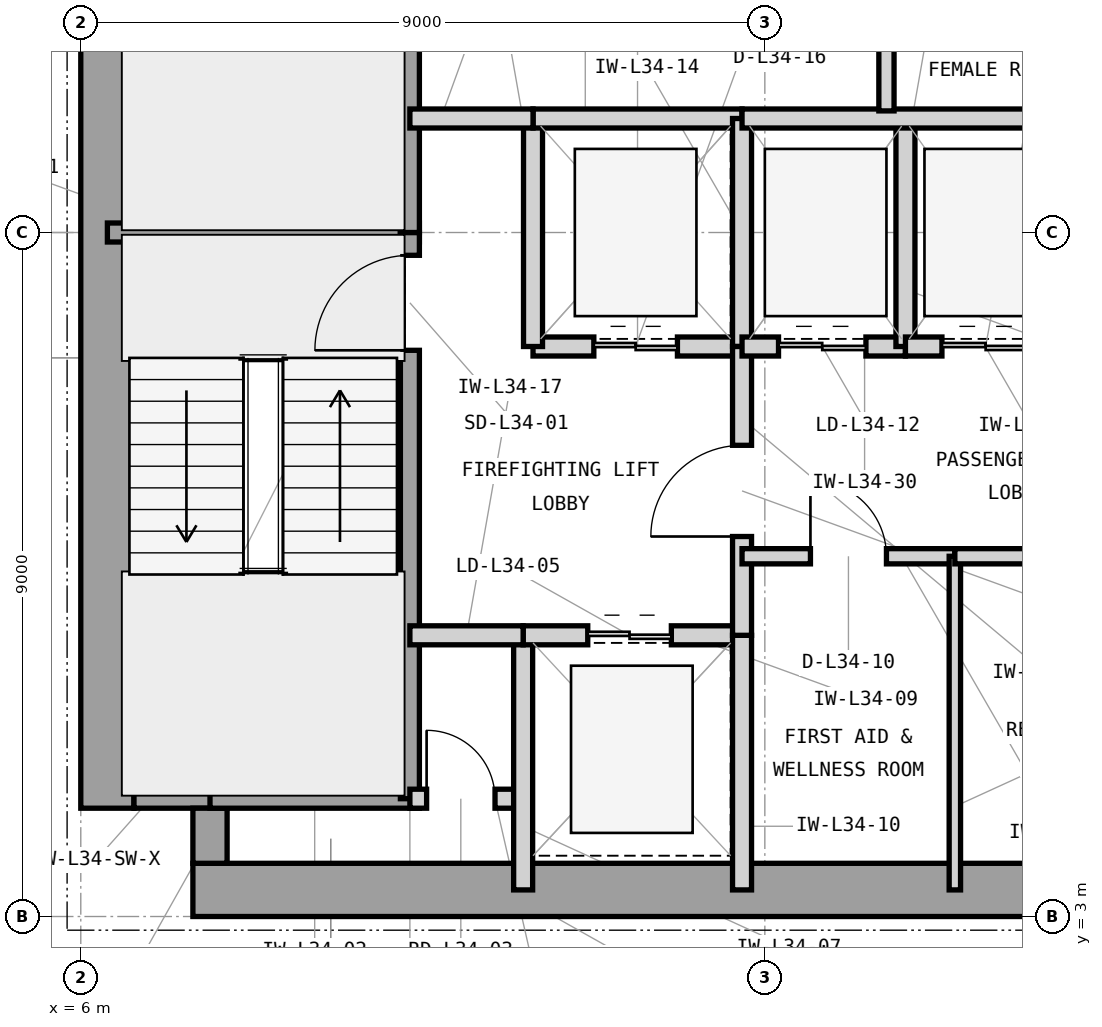
"""IFC4 building model, lengths in metres.
Left out: names, types, materials, properties, quantities, classifications, styles, units other than length and angle.
Written with IfcOpenShell. Run it as: python <this file> out.ifc"""

import sys

from ifc_helpers import new_model, si_unit, direction, frame, frame_2d, origin, place, context, subcontext, project, spatial, rectangle, extrude, element, fill, save


model = new_model("IFC4")
c1 = context("Model", 3, precision=1e-05, world=origin(), true_north=direction((0.0, 1.0)))
c2 = subcontext(c1, "Body", "Model", "MODEL_VIEW")
j1 = project(units=[si_unit("LENGTHUNIT", "METRE"), si_unit("PLANEANGLEUNIT", "RADIAN")], contexts=[c1])
p1 = place(None, origin())
s1 = spatial("IfcSite", under=j1, at=p1, CompositionType="ELEMENT")
p2 = place(p1, origin())
s2 = spatial("IfcBuilding", under=s1, at=p2, CompositionType="ELEMENT")
p3 = place(p2, frame((0.0, 0.0, 144.0)))
s3 = spatial("IfcBuildingStorey", under=s2, at=p3, CompositionType="ELEMENT", Elevation=144.0)
p4 = place(p3, frame((7.475, 3.35, 0.0), z_axis=(0.0, 0.0, 1.0), x_axis=(1.0, 0.0, 0.0)))
e1 = element("IfcWall", 1, at=p4, inside=s3, PredefinedType="SHEAR", context=c2, shape_type="SweptSolid", body=[
    extrude(rectangle(XDim=16.525, YDim=0.7, at=frame_2d((8.262, 0.0))), origin(), (0.0, 0.0, 1.0), 3.9),
])
p5 = place(p3, frame((6.35, 4.425, 0.0), z_axis=(0.0, 0.0, 1.0), x_axis=(0.0, 1.0, 0.0)))
e2 = element("IfcWall", 2, at=p5, inside=s3, PredefinedType="SHEAR", context=c2, shape_type="SweptSolid", body=[
    extrude(rectangle(XDim=15.15, YDim=0.7, at=frame_2d((7.575, 0.0))), origin(), (0.0, 0.0, 1.0), 3.9),
])
p6 = place(p3, frame((6.7, 4.65, 0.0), z_axis=(0.0, 0.0, 1.0), x_axis=(1.0, 0.0, 0.0)))
e3 = element("IfcWall", 3, at=p6, inside=s3, PredefinedType="SHEAR", context=c2, shape_type="SweptSolid", body=[
    extrude(rectangle(XDim=1.225, YDim=0.45, at=frame_2d((0.613, 0.0))), origin(), (0.0, 0.0, 1.0), 3.9),
])
p7 = place(p3, frame((7.7, 3.7, 0.0), z_axis=(0.0, 0.0, 1.0), x_axis=(0.0, 1.0, 0.0)))
e4 = element("IfcWall", 4, at=p7, inside=s3, PredefinedType="SHEAR", context=c2, shape_type="SweptSolid", body=[
    extrude(rectangle(XDim=0.725, YDim=0.45, at=frame_2d((0.363, 0.0))), origin(), (0.0, 0.0, 1.0), 3.9),
])
p8 = place(p3, frame((6.35, 12.0, 0.0), z_axis=(0.0, 0.0, 1.0), x_axis=(1.0, 0.0, 0.0)))
e5 = element("IfcWall", 5, at=p8, inside=s3, PredefinedType="SHEAR", context=c2, shape_type="SweptSolid", body=[
    extrude(rectangle(XDim=4.105, YDim=0.25, at=frame_2d((2.052, 0.0))), origin(), (0.0, 0.0, 1.0), 3.9),
])
p9 = place(p3, frame((7.7, 4.55, 0.0), z_axis=(0.0, 0.0, 1.0), x_axis=(1.0, 0.0, 0.0)))
e6 = element("IfcWall", 6, at=p9, inside=s3, PredefinedType="SHEAR", context=c2, shape_type="SweptSolid", body=[
    extrude(rectangle(XDim=2.755, YDim=0.25, at=frame_2d((1.377, 0.0))), origin(), (0.0, 0.0, 1.0), 3.9),
])
p10 = place(p3, frame((10.33, 4.55, 0.0), z_axis=(0.0, 0.0, 1.0), x_axis=(0.0, 1.0, 0.0)))
e7 = element("IfcWall", 7, at=p10, inside=s3, PredefinedType="SHEAR", context=c2, shape_type="SweptSolid", body=[
    extrude(rectangle(XDim=7.45, YDim=0.25, at=frame_2d((3.725, 0.0))), origin(), (0.0, 0.0, 1.0), 3.9),
])
p11 = place(p10, frame((5.9, 0.0, 0.0)))
e8 = element("IfcOpeningElement", 8, at=p11, cuts=e7, PredefinedType="OPENING", context=c2, shape_type="SweptSolid", body=[
    extrude(rectangle(XDim=1.25, YDim=2.2, at=frame_2d((0.625, 1.1))), frame((0.0, 0.135, 0.0), z_axis=(0.0, -1.0, 0.0), x_axis=(1.0, 0.0, 0.0)), (0.0, 0.0, 1.0), 0.27),
])
p12 = place(p3, frame((10.33, 12.0, 0.0), z_axis=(0.0, 0.0, 1.0), x_axis=(0.0, 1.0, 0.0)))
e9 = element("IfcWall", 9, at=p12, inside=s3, PredefinedType="SHEAR", context=c2, shape_type="SweptSolid", body=[
    extrude(rectangle(XDim=7.45, YDim=0.25, at=frame_2d((3.725, 0.0))), origin(), (0.0, 0.0, 1.0), 3.9),
])
p13 = place(p12, frame((5.85, 0.0, 0.0)))
e10 = element("IfcOpeningElement", 10, at=p13, cuts=e9, PredefinedType="OPENING", context=c2, shape_type="SweptSolid", body=[
    extrude(rectangle(XDim=1.25, YDim=2.2, at=frame_2d((0.625, 1.1))), frame((0.0, 0.135, 0.0), z_axis=(0.0, -1.0, 0.0), x_axis=(1.0, 0.0, 0.0)), (0.0, 0.0, 1.0), 0.27),
])
p14 = place(p3, frame((10.33, 4.55, 0.0), z_axis=(0.0, 0.0, 1.0), x_axis=(1.0, 0.0, 0.0)))
e11 = element("IfcWall", 11, at=p14, inside=s3, PredefinedType="PARTITIONING", context=c2, shape_type="SweptSolid", body=[
    extrude(rectangle(XDim=1.49, YDim=0.25, at=frame_2d((0.745, 0.0))), origin(), (0.0, 0.0, 1.0), 3.69),
])
p15 = place(p14, frame((0.22, 0.0, 0.0)))
e12 = element("IfcOpeningElement", 12, at=p15, cuts=e11, PredefinedType="OPENING", context=c2, shape_type="SweptSolid", body=[
    extrude(rectangle(XDim=0.9, YDim=2.1, at=frame_2d((0.45, 1.05))), frame((0.0, 0.135, 0.0), z_axis=(0.0, -1.0, 0.0), x_axis=(1.0, 0.0, 0.0)), (0.0, 0.0, 1.0), 0.27),
])
p16 = place(p3, frame((11.82, 3.35, 0.0), z_axis=(0.0, 0.0, 1.0), x_axis=(0.0, 1.0, 0.0)))
e13 = element("IfcWall", 13, at=p16, inside=s3, PredefinedType="PARTITIONING", context=c2, shape_type="SweptSolid", body=[
    extrude(rectangle(XDim=3.35, YDim=0.25, at=frame_2d((1.675, 0.0))), origin(), (0.0, 0.0, 1.0), 3.69),
])
p17 = place(p3, frame((11.82, 6.7, 0.0), z_axis=(0.0, 0.0, 1.0), x_axis=(1.0, 0.0, 0.0)))
e14 = element("IfcWall", 14, at=p17, inside=s3, PredefinedType="PARTITIONING", context=c2, shape_type="SweptSolid", body=[
    extrude(rectangle(XDim=2.88, YDim=0.25, at=frame_2d((1.44, 0.0))), origin(), (0.0, 0.0, 1.0), 3.233),
])
p18 = place(p17, frame((0.85, 0.0, 0.0)))
e15 = element("IfcOpeningElement", 15, at=p18, cuts=e14, PredefinedType="OPENING", context=c2, shape_type="SweptSolid", body=[
    extrude(rectangle(XDim=1.1, YDim=2.25, at=frame_2d((0.55, 1.125))), frame((0.0, 0.135, 0.0), z_axis=(0.0, -1.0, 0.0), x_axis=(1.0, 0.0, 0.0)), (0.0, 0.0, 1.0), 0.27),
])
p19 = place(p3, frame((14.7, 3.35, 0.0), z_axis=(0.0, 0.0, 1.0), x_axis=(0.0, 1.0, 0.0)))
e16 = element("IfcWall", 16, at=p19, inside=s3, PredefinedType="PARTITIONING", context=c2, shape_type="SweptSolid", body=[
    extrude(rectangle(XDim=3.35, YDim=0.25, at=frame_2d((1.675, 0.0))), origin(), (0.0, 0.0, 1.0), 3.69),
])
p20 = place(p3, frame((11.95, 10.5, 0.0), z_axis=(0.0, 0.0, 1.0), x_axis=(1.0, 0.0, 0.0)))
e17 = element("IfcWall", 17, at=p20, inside=s3, PredefinedType="PARTITIONING", context=c2, shape_type="SweptSolid", body=[
    extrude(rectangle(XDim=2.75, YDim=0.25, at=frame_2d((1.375, 0.0))), origin(), (0.0, 0.0, 1.0), 3.233),
])
p21 = place(p20, frame((0.8, 0.0, 0.0)))
e18 = element("IfcOpeningElement", 18, at=p21, cuts=e17, PredefinedType="OPENING", context=c2, shape_type="SweptSolid", body=[
    extrude(rectangle(XDim=1.1, YDim=2.25, at=frame_2d((0.55, 1.125))), frame((0.0, 0.135, 0.0), z_axis=(0.0, -1.0, 0.0), x_axis=(1.0, 0.0, 0.0)), (0.0, 0.0, 1.0), 0.27),
])
p22 = place(p3, frame((11.95, 10.5, 0.0), z_axis=(0.0, 0.0, 1.0), x_axis=(0.0, 1.0, 0.0)))
e19 = element("IfcWall", 19, at=p22, inside=s3, PredefinedType="PARTITIONING", context=c2, shape_type="SweptSolid", body=[
    extrude(rectangle(XDim=3.0, YDim=0.25, at=frame_2d((1.5, 0.0))), origin(), (0.0, 0.0, 1.0), 3.69),
])
p23 = place(p3, frame((11.95, 13.5, 0.0), z_axis=(0.0, 0.0, 1.0), x_axis=(1.0, 0.0, 0.0)))
e20 = element("IfcWall", 20, at=p23, inside=s3, PredefinedType="PARTITIONING", context=c2, shape_type="SweptSolid", body=[
    extrude(rectangle(XDim=2.75, YDim=0.25, at=frame_2d((1.375, 0.0))), origin(), (0.0, 0.0, 1.0), 3.233),
])
p24 = place(p3, frame((14.7, 10.5, 0.0), z_axis=(0.0, 0.0, 1.0), x_axis=(0.0, 1.0, 0.0)))
e21 = element("IfcWall", 21, at=p24, inside=s3, PredefinedType="PARTITIONING", context=c2, shape_type="SweptSolid", body=[
    extrude(rectangle(XDim=3.0, YDim=0.25, at=frame_2d((1.5, 0.0))), origin(), (0.0, 0.0, 1.0), 3.69),
])
p25 = place(p3, frame((14.7, 6.7, 0.0), z_axis=(0.0, 0.0, 1.0), x_axis=(0.0, 1.0, 0.0)))
e22 = element("IfcWall", 22, at=p25, inside=s3, PredefinedType="PARTITIONING", context=c2, shape_type="SweptSolid", body=[
    extrude(rectangle(XDim=3.8, YDim=0.25, at=frame_2d((1.9, 0.0))), origin(), (0.0, 0.0, 1.0), 3.69),
])
p26 = place(p25, frame((1.3, 0.0, 0.0)))
e23 = element("IfcOpeningElement", 23, at=p26, cuts=e22, PredefinedType="OPENING", context=c2, shape_type="SweptSolid", body=[
    extrude(rectangle(XDim=1.2, YDim=2.2, at=frame_2d((0.6, 1.1))), frame((0.0, 0.135, 0.0), z_axis=(0.0, -1.0, 0.0), x_axis=(1.0, 0.0, 0.0)), (0.0, 0.0, 1.0), 0.27),
])
p27 = place(p3, frame((10.33, 13.5, 0.0), z_axis=(0.0, 0.0, 1.0), x_axis=(1.0, 0.0, 0.0)))
e24 = element("IfcWall", 24, at=p27, inside=s3, PredefinedType="PARTITIONING", context=c2, shape_type="SweptSolid", body=[
    extrude(rectangle(XDim=1.62, YDim=0.25, at=frame_2d((0.81, 0.0))), origin(), (0.0, 0.0, 1.0), 3.233),
])
p28 = place(p3, frame((10.33, 6.7, 0.0), z_axis=(0.0, 0.0, 1.0), x_axis=(1.0, 0.0, 0.0)))
e25 = element("IfcWall", 25, at=p28, inside=s3, PredefinedType="PARTITIONING", context=c2, shape_type="SweptSolid", body=[
    extrude(rectangle(XDim=1.49, YDim=0.25, at=frame_2d((0.745, 0.0))), origin(), (0.0, 0.0, 1.0), 3.233),
])
p29 = place(p3, frame((14.7, 7.74, 0.0), z_axis=(0.0, 0.0, 1.0), x_axis=(1.0, 0.0, 0.0)))
e26 = element("IfcWall", 26, at=p29, inside=s3, PredefinedType="PARTITIONING", context=c2, shape_type="SweptSolid", body=[
    extrude(rectangle(XDim=2.8, YDim=0.2, at=frame_2d((1.4, 0.0))), origin(), (0.0, 0.0, 1.0), 3.69),
])
p30 = place(p29, frame((0.9, 0.0, 0.0)))
e27 = element("IfcOpeningElement", 27, at=p30, cuts=e26, PredefinedType="OPENING", context=c2, shape_type="SweptSolid", body=[
    extrude(rectangle(XDim=1.0, YDim=2.15, at=frame_2d((0.5, 1.075))), frame((0.0, 0.11, 0.0), z_axis=(0.0, -1.0, 0.0), x_axis=(1.0, 0.0, 0.0)), (0.0, 0.0, 1.0), 0.22),
])
p31 = place(p3, frame((17.5, 3.35, 0.0), z_axis=(0.0, 0.0, 1.0), x_axis=(0.0, 1.0, 0.0)))
e28 = element("IfcWall", 28, at=p31, inside=s3, PredefinedType="PARTITIONING", context=c2, shape_type="SweptSolid", body=[
    extrude(rectangle(XDim=4.39, YDim=0.15, at=frame_2d((2.195, 0.0))), origin(), (0.0, 0.0, 1.0), 3.69),
])
p32 = place(p3, frame((17.5, 7.74, 0.0), z_axis=(0.0, 0.0, 1.0), x_axis=(1.0, 0.0, 0.0)))
e29 = element("IfcWall", 29, at=p32, inside=s3, PredefinedType="PARTITIONING", context=c2, shape_type="SweptSolid", body=[
    extrude(rectangle(XDim=6.15, YDim=0.2, at=frame_2d((3.075, 0.0))), origin(), (0.0, 0.0, 1.0), 3.69),
])
p33 = place(p32, frame((2.575, 0.0, 0.0)))
e30 = element("IfcOpeningElement", 30, at=p33, cuts=e29, PredefinedType="OPENING", context=c2, shape_type="SweptSolid", body=[
    extrude(rectangle(XDim=1.0, YDim=2.15, at=frame_2d((0.5, 1.075))), frame((0.0, 0.11, 0.0), z_axis=(0.0, -1.0, 0.0), x_axis=(1.0, 0.0, 0.0)), (0.0, 0.0, 1.0), 0.22),
])
p34 = place(p3, frame((14.7, 10.5, 0.0), z_axis=(0.0, 0.0, 1.0), x_axis=(1.0, 0.0, 0.0)))
e31 = element("IfcWall", 31, at=p34, inside=s3, PredefinedType="PARTITIONING", context=c2, shape_type="SweptSolid", body=[
    extrude(rectangle(XDim=2.15, YDim=0.25, at=frame_2d((1.075, 0.0))), origin(), (0.0, 0.0, 1.0), 3.233),
])
p35 = place(p34, frame((0.48, 0.0, 0.0)))
e32 = element("IfcOpeningElement", 32, at=p35, cuts=e31, PredefinedType="OPENING", context=c2, shape_type="SweptSolid", body=[
    extrude(rectangle(XDim=1.15, YDim=2.25, at=frame_2d((0.575, 1.125))), frame((0.0, 0.135, 0.0), z_axis=(0.0, -1.0, 0.0), x_axis=(1.0, 0.0, 0.0)), (0.0, 0.0, 1.0), 0.27),
])
p36 = place(p3, frame((16.85, 10.5, 0.0), z_axis=(0.0, 0.0, 1.0), x_axis=(0.0, 1.0, 0.0)))
e33 = element("IfcWall", 33, at=p36, inside=s3, PredefinedType="PARTITIONING", context=c2, shape_type="SweptSolid", body=[
    extrude(rectangle(XDim=3.0, YDim=0.25, at=frame_2d((1.5, 0.0))), origin(), (0.0, 0.0, 1.0), 3.69),
])
p37 = place(p3, frame((16.85, 10.5, 0.0), z_axis=(0.0, 0.0, 1.0), x_axis=(1.0, 0.0, 0.0)))
e34 = element("IfcWall", 34, at=p37, inside=s3, PredefinedType="PARTITIONING", context=c2, shape_type="SweptSolid", body=[
    extrude(rectangle(XDim=2.1, YDim=0.25, at=frame_2d((1.05, 0.0))), origin(), (0.0, 0.0, 1.0), 3.233),
])
p38 = place(p37, frame((0.48, 0.0, 0.0)))
e35 = element("IfcOpeningElement", 35, at=p38, cuts=e34, PredefinedType="OPENING", context=c2, shape_type="SweptSolid", body=[
    extrude(rectangle(XDim=1.15, YDim=2.25, at=frame_2d((0.575, 1.125))), frame((0.0, 0.135, 0.0), z_axis=(0.0, -1.0, 0.0), x_axis=(1.0, 0.0, 0.0)), (0.0, 0.0, 1.0), 0.27),
])
p39 = place(p3, frame((14.7, 13.5, 0.0), z_axis=(0.0, 0.0, 1.0), x_axis=(1.0, 0.0, 0.0)))
e36 = element("IfcWall", 36, at=p39, inside=s3, PredefinedType="PARTITIONING", context=c2, shape_type="SweptSolid", body=[
    extrude(rectangle(XDim=8.95, YDim=0.25, at=frame_2d((4.475, 0.0))), origin(), (0.0, 0.0, 1.0), 3.233),
])
p40 = place(p3, frame((16.6, 13.6, 0.0), z_axis=(0.0, 0.0, 1.0), x_axis=(0.0, 1.0, 0.0)))
e37 = element("IfcWall", 37, at=p40, inside=s3, PredefinedType="PARTITIONING", context=c2, shape_type="SweptSolid", body=[
    extrude(rectangle(XDim=3.0, YDim=0.2, at=frame_2d((1.5, 0.0))), origin(), (0.0, 0.0, 1.0), 3.69),
])
p41 = place(p40, frame((1.02, 0.0, 0.0)))
e38 = element("IfcOpeningElement", 38, at=p41, cuts=e37, PredefinedType="OPENING", context=c2, shape_type="SweptSolid", body=[
    extrude(rectangle(XDim=0.95, YDim=2.1, at=frame_2d((0.475, 1.05))), frame((0.0, 0.11, 0.0), z_axis=(0.0, -1.0, 0.0), x_axis=(1.0, 0.0, 0.0)), (0.0, 0.0, 1.0), 0.22),
])
p42 = place(p11, origin())
e39 = element("IfcDoor", 39, at=p42, inside=s3, OperationType="SINGLE_SWING_LEFT", PredefinedType="DOOR", context=c2, shape_type="SweptSolid", body=[
    extrude(rectangle(XDim=1.25, YDim=2.2, at=frame_2d((0.625, 1.1))), frame((0.0, 0.025, 0.0), z_axis=(0.0, -1.0, 0.0), x_axis=(1.0, 0.0, 0.0)), (0.0, 0.0, 1.0), 0.05),
])
fill(e8, e39)
p43 = place(p15, origin())
e40 = element("IfcDoor", 40, at=p43, inside=s3, OperationType="SINGLE_SWING_LEFT", PredefinedType="TRAPDOOR", context=c2, shape_type="SweptSolid", body=[
    extrude(rectangle(XDim=0.9, YDim=2.1, at=frame_2d((0.45, 1.05))), frame((0.0, 0.025, 0.0), z_axis=(0.0, -1.0, 0.0), x_axis=(1.0, 0.0, 0.0)), (0.0, 0.0, 1.0), 0.05),
])
fill(e12, e40)
p44 = place(p18, origin())
e41 = element("IfcDoor", 41, at=p44, inside=s3, OperationType="DOUBLE_DOOR_SLIDING", PredefinedType="DOOR", context=c2, shape_type="SweptSolid", body=[
    extrude(rectangle(XDim=1.1, YDim=2.25, at=frame_2d((0.55, 1.125))), frame((0.0, 0.025, 0.0), z_axis=(0.0, -1.0, 0.0), x_axis=(1.0, 0.0, 0.0)), (0.0, 0.0, 1.0), 0.05),
])
fill(e15, e41)
p45 = place(p21, origin())
e42 = element("IfcDoor", 42, at=p45, inside=s3, OperationType="DOUBLE_DOOR_SLIDING", PredefinedType="DOOR", context=c2, shape_type="SweptSolid", body=[
    extrude(rectangle(XDim=1.1, YDim=2.25, at=frame_2d((0.55, 1.125))), frame((0.0, 0.025, 0.0), z_axis=(0.0, -1.0, 0.0), x_axis=(1.0, 0.0, 0.0)), (0.0, 0.0, 1.0), 0.05),
])
fill(e18, e42)
p46 = place(p26, origin())
e43 = element("IfcDoor", 43, at=p46, inside=s3, OperationType="SINGLE_SWING_LEFT", PredefinedType="DOOR", context=c2, shape_type="SweptSolid", body=[
    extrude(rectangle(XDim=1.2, YDim=2.2, at=frame_2d((0.6, 1.1))), frame((0.0, 0.025, 0.0), z_axis=(0.0, -1.0, 0.0), x_axis=(1.0, 0.0, 0.0)), (0.0, 0.0, 1.0), 0.05),
])
fill(e23, e43)
p47 = place(p30, origin())
e44 = element("IfcDoor", 44, at=p47, inside=s3, OperationType="SINGLE_SWING_LEFT", PredefinedType="DOOR", context=c2, shape_type="SweptSolid", body=[
    extrude(rectangle(XDim=1.0, YDim=2.15, at=frame_2d((0.5, 1.075))), frame((0.0, 0.025, 0.0), z_axis=(0.0, -1.0, 0.0), x_axis=(1.0, 0.0, 0.0)), (0.0, 0.0, 1.0), 0.05),
])
fill(e27, e44)
p48 = place(p35, origin())
e45 = element("IfcDoor", 45, at=p48, inside=s3, OperationType="DOUBLE_DOOR_SLIDING", PredefinedType="DOOR", context=c2, shape_type="SweptSolid", body=[
    extrude(rectangle(XDim=1.15, YDim=2.25, at=frame_2d((0.575, 1.125))), frame((0.0, 0.025, 0.0), z_axis=(0.0, -1.0, 0.0), x_axis=(1.0, 0.0, 0.0)), (0.0, 0.0, 1.0), 0.05),
])
fill(e32, e45)
p49 = place(p38, origin())
e46 = element("IfcDoor", 46, at=p49, inside=s3, OperationType="DOUBLE_DOOR_SLIDING", PredefinedType="DOOR", context=c2, shape_type="SweptSolid", body=[
    extrude(rectangle(XDim=1.15, YDim=2.25, at=frame_2d((0.575, 1.125))), frame((0.0, 0.025, 0.0), z_axis=(0.0, -1.0, 0.0), x_axis=(1.0, 0.0, 0.0)), (0.0, 0.0, 1.0), 0.05),
])
fill(e35, e46)
save(model, sys.argv[1])
